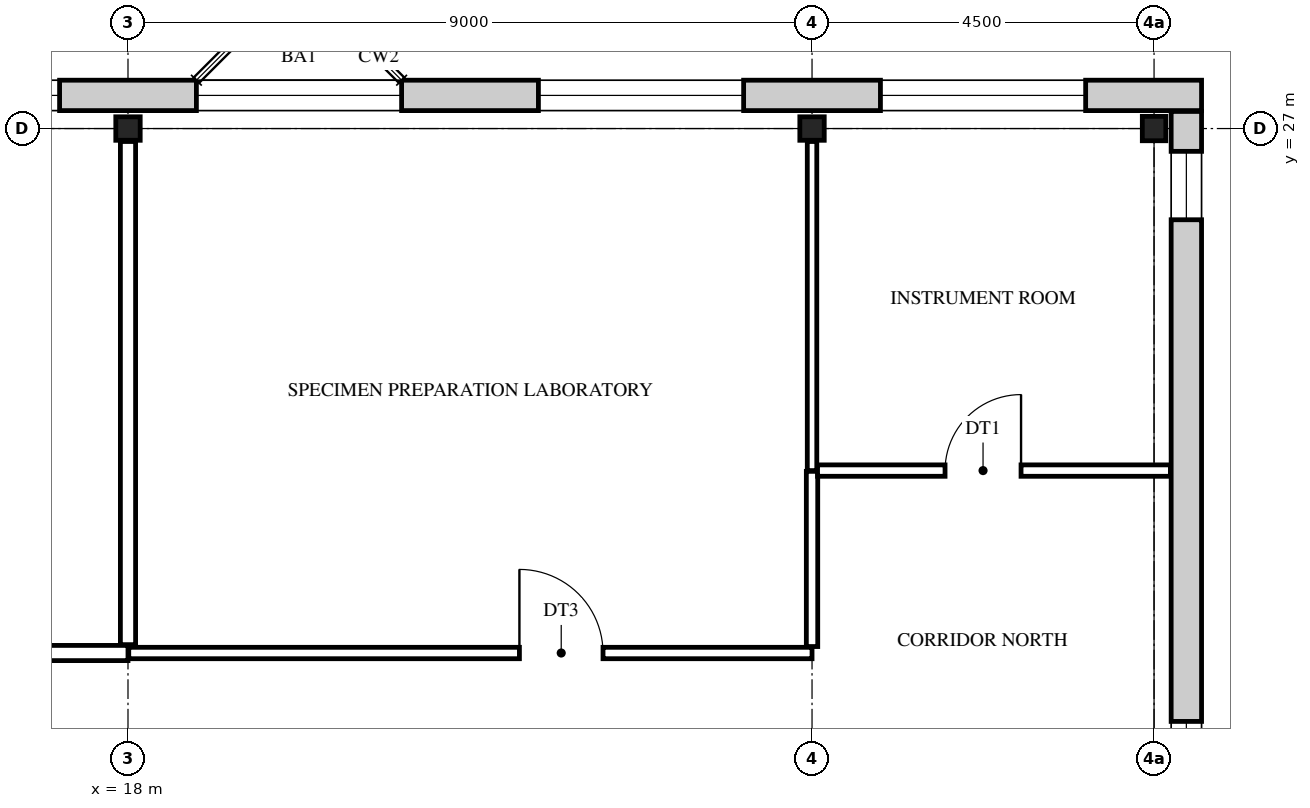
"""IFC4 building model, lengths in metres.
Left out: names, types, materials, properties, quantities, classifications, styles, units other than length and angle.
Written with IfcOpenShell. Run it as: python <this file> out.ifc"""

import sys

from ifc_helpers import new_model, si_unit, direction, frame, frame_2d, origin, origin_2d, place, context, subcontext, project, spatial, rectangle, i_section, extrude, element, fill, save


model = new_model("IFC4")
c1 = context("Model", 3, precision=1e-05, world=origin(), true_north=direction((0.0, 1.0)))
c2 = subcontext(c1, "Body", "Model", "MODEL_VIEW")
j1 = project(units=[si_unit("LENGTHUNIT", "METRE"), si_unit("PLANEANGLEUNIT", "RADIAN")], contexts=[c1])
p1 = place(None, origin())
s1 = spatial("IfcSite", under=j1, at=p1, CompositionType="ELEMENT")
p2 = place(p1, origin())
s2 = spatial("IfcBuilding", under=s1, at=p2, CompositionType="ELEMENT")
p3 = place(p2, frame((0.0, 0.0, 44.4)))
s3 = spatial("IfcBuildingStorey", under=s2, at=p3, CompositionType="ELEMENT", Elevation=44.4)
for number, where, z_axis, x_axis in (
    (1, (18.0, 27.0, 0.0), (0.0, 0.0, 1.0), (0.0, 1.0, 0.0)),
    (2, (27.0, 27.0, 0.0), (0.0, 0.0, 1.0), (0.0, 1.0, 0.0)),
    (3, (31.5, 27.0, 0.0), (0.0, 0.0, 1.0), (1.0, 0.0, 0.0)),
):
    element("IfcColumn", number, at=place(p3, frame(where, z_axis=z_axis, x_axis=x_axis)), inside=s3, PredefinedType="COLUMN", context=c2, shape_type="SweptSolid", body=[
        extrude(i_section(OverallWidth=0.309, OverallDepth=0.321, WebThickness=0.014, FlangeThickness=0.022, FilletRadius=0.017, at=origin_2d()), origin(), (0.0, 0.0, 1.0), 4.2),
    ])
p4 = place(p3, frame((-0.625, 27.436, 0.0), z_axis=(0.0, 0.0, 1.0), x_axis=(1.0, 0.0, 0.0)))
e4 = element("IfcWall", 4, at=p4, inside=s3, PredefinedType="STANDARD", context=c2, shape_type="SweptSolid", body=[
    extrude(rectangle(XDim=32.75, YDim=0.4, at=frame_2d((16.375, 0.0))), origin(), (0.0, 0.0, 1.0), 4.2),
])
p5 = place(p4, frame((1.525, 0.0, 0.9)))
e5 = element("IfcOpeningElement", 5, at=p5, cuts=e4, PredefinedType="OPENING", context=c2, shape_type="SweptSolid", body=[
    extrude(rectangle(XDim=2.7, YDim=2.5, at=frame_2d((1.35, 1.25))), frame((0.0, 0.21, 0.0), z_axis=(0.0, -1.0, 0.0), x_axis=(1.0, 0.0, 0.0)), (0.0, 0.0, 1.0), 0.42),
])
p6 = place(p4, frame((6.025, 0.0, 0.9)))
e6 = element("IfcOpeningElement", 6, at=p6, cuts=e4, PredefinedType="OPENING", context=c2, shape_type="SweptSolid", body=[
    extrude(rectangle(XDim=2.7, YDim=2.5, at=frame_2d((1.35, 1.25))), frame((0.0, 0.21, 0.0), z_axis=(0.0, -1.0, 0.0), x_axis=(1.0, 0.0, 0.0)), (0.0, 0.0, 1.0), 0.42),
])
p7 = place(p4, frame((10.525, 0.0, 0.9)))
e7 = element("IfcOpeningElement", 7, at=p7, cuts=e4, PredefinedType="OPENING", context=c2, shape_type="SweptSolid", body=[
    extrude(rectangle(XDim=2.7, YDim=2.5, at=frame_2d((1.35, 1.25))), frame((0.0, 0.21, 0.0), z_axis=(0.0, -1.0, 0.0), x_axis=(1.0, 0.0, 0.0)), (0.0, 0.0, 1.0), 0.42),
])
p8 = place(p4, frame((15.025, 0.0, 0.9)))
e8 = element("IfcOpeningElement", 8, at=p8, cuts=e4, PredefinedType="OPENING", context=c2, shape_type="SweptSolid", body=[
    extrude(rectangle(XDim=2.7, YDim=2.5, at=frame_2d((1.35, 1.25))), frame((0.0, 0.21, 0.0), z_axis=(0.0, -1.0, 0.0), x_axis=(1.0, 0.0, 0.0)), (0.0, 0.0, 1.0), 0.42),
])
p9 = place(p4, frame((19.525, 0.0, 0.9)))
e9 = element("IfcOpeningElement", 9, at=p9, cuts=e4, PredefinedType="OPENING", context=c2, shape_type="SweptSolid", body=[
    extrude(rectangle(XDim=2.7, YDim=2.5, at=frame_2d((1.35, 1.25))), frame((0.0, 0.21, 0.0), z_axis=(0.0, -1.0, 0.0), x_axis=(1.0, 0.0, 0.0)), (0.0, 0.0, 1.0), 0.42),
])
p10 = place(p4, frame((24.025, 0.0, 0.9)))
e10 = element("IfcOpeningElement", 10, at=p10, cuts=e4, PredefinedType="OPENING", context=c2, shape_type="SweptSolid", body=[
    extrude(rectangle(XDim=2.7, YDim=2.5, at=frame_2d((1.35, 1.25))), frame((0.0, 0.21, 0.0), z_axis=(0.0, -1.0, 0.0), x_axis=(1.0, 0.0, 0.0)), (0.0, 0.0, 1.0), 0.42),
])
p11 = place(p4, frame((28.525, 0.0, 0.9)))
e11 = element("IfcOpeningElement", 11, at=p11, cuts=e4, PredefinedType="OPENING", context=c2, shape_type="SweptSolid", body=[
    extrude(rectangle(XDim=2.7, YDim=2.5, at=frame_2d((1.35, 1.25))), frame((0.0, 0.21, 0.0), z_axis=(0.0, -1.0, 0.0), x_axis=(1.0, 0.0, 0.0)), (0.0, 0.0, 1.0), 0.42),
])
p12 = place(p3, frame((31.925, 27.225, 0.0), z_axis=(0.0, 0.0, 1.0), x_axis=(0.0, -1.0, 0.0)))
e12 = element("IfcWall", 12, at=p12, inside=s3, PredefinedType="STANDARD", context=c2, shape_type="SweptSolid", body=[
    extrude(rectangle(XDim=27.45, YDim=0.4, at=frame_2d((13.725, 0.0))), origin(), (0.0, 0.0, 1.0), 4.2),
])
p13 = place(p12, frame((26.025, 0.0, 0.9)))
e13 = element("IfcOpeningElement", 13, at=p13, cuts=e12, PredefinedType="OPENING", context=c2, shape_type="SweptSolid", body=[
    extrude(rectangle(XDim=0.9, YDim=2.0, at=frame_2d((0.45, 1.0))), frame((0.0, 0.21, 0.0), z_axis=(0.0, -1.0, 0.0), x_axis=(1.0, 0.0, 0.0)), (0.0, 0.0, 1.0), 0.42),
])
p14 = place(p12, frame((18.525, 0.0, 0.9)))
e14 = element("IfcOpeningElement", 14, at=p14, cuts=e12, PredefinedType="OPENING", context=c2, shape_type="SweptSolid", body=[
    extrude(rectangle(XDim=0.9, YDim=2.0, at=frame_2d((0.45, 1.0))), frame((0.0, 0.21, 0.0), z_axis=(0.0, -1.0, 0.0), x_axis=(1.0, 0.0, 0.0)), (0.0, 0.0, 1.0), 0.42),
])
p15 = place(p12, frame((15.675, 0.0, 1.6)))
e15 = element("IfcOpeningElement", 15, at=p15, cuts=e12, PredefinedType="OPENING", context=c2, shape_type="SweptSolid", body=[
    extrude(rectangle(XDim=0.6, YDim=0.9, at=frame_2d((0.3, 0.45))), frame((0.0, 0.21, 0.0), z_axis=(0.0, -1.0, 0.0), x_axis=(1.0, 0.0, 0.0)), (0.0, 0.0, 1.0), 0.42),
])
p16 = place(p12, frame((11.175, 0.0, 1.6)))
e16 = element("IfcOpeningElement", 16, at=p16, cuts=e12, PredefinedType="OPENING", context=c2, shape_type="SweptSolid", body=[
    extrude(rectangle(XDim=0.6, YDim=0.9, at=frame_2d((0.3, 0.45))), frame((0.0, 0.21, 0.0), z_axis=(0.0, -1.0, 0.0), x_axis=(1.0, 0.0, 0.0)), (0.0, 0.0, 1.0), 0.42),
])
p17 = place(p12, frame((8.025, 0.0, 0.9)))
e17 = element("IfcOpeningElement", 17, at=p17, cuts=e12, PredefinedType="OPENING", context=c2, shape_type="SweptSolid", body=[
    extrude(rectangle(XDim=0.9, YDim=2.0, at=frame_2d((0.45, 1.0))), frame((0.0, 0.21, 0.0), z_axis=(0.0, -1.0, 0.0), x_axis=(1.0, 0.0, 0.0)), (0.0, 0.0, 1.0), 0.42),
])
p18 = place(p12, frame((0.525, 0.0, 0.9)))
e18 = element("IfcOpeningElement", 18, at=p18, cuts=e12, PredefinedType="OPENING", context=c2, shape_type="SweptSolid", body=[
    extrude(rectangle(XDim=0.9, YDim=2.0, at=frame_2d((0.45, 1.0))), frame((0.0, 0.21, 0.0), z_axis=(0.0, -1.0, 0.0), x_axis=(1.0, 0.0, 0.0)), (0.0, 0.0, 1.0), 0.42),
])
p19 = place(p3, frame((18.0, 20.21, 0.0), z_axis=(0.0, 0.0, 1.0), x_axis=(0.0, 1.0, 0.0)))
e19 = element("IfcWall", 19, at=p19, inside=s3, PredefinedType="PARTITIONING", context=c2, shape_type="SweptSolid", body=[
    extrude(rectangle(XDim=6.62, YDim=0.2, at=frame_2d((3.31, 0.0))), origin(), (0.0, 0.0, 1.0), 3.542),
])
p20 = place(p3, frame((27.0, 20.185, 0.0), z_axis=(0.0, 0.0, 1.0), x_axis=(0.0, 1.0, 0.0)))
e20 = element("IfcWall", 20, at=p20, inside=s3, PredefinedType="PARTITIONING", context=c2, shape_type="SweptSolid", body=[
    extrude(rectangle(XDim=2.305, YDim=0.15, at=frame_2d((1.152, 0.0))), origin(), (0.0, 0.0, 1.0), 3.542),
])
p21 = place(p3, frame((27.0, 22.5, 0.0), z_axis=(0.0, 0.0, 1.0), x_axis=(0.0, 1.0, 0.0)))
e21 = element("IfcWall", 21, at=p21, inside=s3, PredefinedType="PARTITIONING", context=c2, shape_type="SweptSolid", body=[
    extrude(rectangle(XDim=4.33, YDim=0.125, at=frame_2d((2.165, 0.0))), origin(), (0.0, 0.0, 1.0), 3.542),
])
p22 = place(p3, frame((6.9, 20.1, 0.0), z_axis=(0.0, 0.0, 1.0), x_axis=(1.0, 0.0, 0.0)))
e22 = element("IfcWall", 22, at=p22, inside=s3, PredefinedType="PARTITIONING", context=c2, shape_type="SweptSolid", body=[
    extrude(rectangle(XDim=11.1, YDim=0.2, at=frame_2d((5.55, 0.0))), origin(), (0.0, 0.0, 1.0), 3.542),
])
p23 = place(p22, frame((4.0, 0.0, 0.0)))
e23 = element("IfcOpeningElement", 23, at=p23, cuts=e22, PredefinedType="OPENING", context=c2, shape_type="SweptSolid", body=[
    extrude(rectangle(XDim=1.0, YDim=2.1, at=frame_2d((0.5, 1.05))), frame((0.0, 0.11, 0.0), z_axis=(0.0, -1.0, 0.0), x_axis=(1.0, 0.0, 0.0)), (0.0, 0.0, 1.0), 0.22),
])
p24 = place(p3, frame((18.01, 20.1, 0.0), z_axis=(0.0, 0.0, 1.0), x_axis=(1.0, 0.0, 0.0)))
e24 = element("IfcWall", 24, at=p24, inside=s3, PredefinedType="PARTITIONING", context=c2, shape_type="SweptSolid", body=[
    extrude(rectangle(XDim=8.99, YDim=0.15, at=frame_2d((4.495, 0.0))), origin(), (0.0, 0.0, 1.0), 3.542),
])
p25 = place(p24, frame((5.14, 0.0, 0.0)))
e25 = element("IfcOpeningElement", 25, at=p25, cuts=e24, PredefinedType="OPENING", context=c2, shape_type="SweptSolid", body=[
    extrude(rectangle(XDim=1.1, YDim=2.1, at=frame_2d((0.55, 1.05))), frame((0.0, 0.085, 0.0), z_axis=(0.0, -1.0, 0.0), x_axis=(1.0, 0.0, 0.0)), (0.0, 0.0, 1.0), 0.17),
])
p26 = place(p3, frame((27.073, 22.5, 0.0), z_axis=(0.0, 0.0, 1.0), x_axis=(1.0, 0.0, 0.0)))
e26 = element("IfcWall", 26, at=p26, inside=s3, PredefinedType="PARTITIONING", context=c2, shape_type="SweptSolid", body=[
    extrude(rectangle(XDim=4.643, YDim=0.15, at=frame_2d((2.321, 0.0))), origin(), (0.0, 0.0, 1.0), 3.542),
])
p27 = place(p26, frame((1.677, 0.0, 0.0)))
e27 = element("IfcOpeningElement", 27, at=p27, cuts=e26, PredefinedType="OPENING", context=c2, shape_type="SweptSolid", body=[
    extrude(rectangle(XDim=1.0, YDim=2.1, at=frame_2d((0.5, 1.05))), frame((0.0, 0.085, 0.0), z_axis=(0.0, -1.0, 0.0), x_axis=(1.0, 0.0, 0.0)), (0.0, 0.0, 1.0), 0.17),
])
p28 = place(p8, origin())
e28 = element("IfcWindow", 28, at=p28, inside=s3, PartitioningType="SINGLE_PANEL", PredefinedType="WINDOW", context=c2, shape_type="SweptSolid", body=[
    extrude(rectangle(XDim=2.7, YDim=2.5, at=frame_2d((1.35, 1.25))), frame((0.0, 0.03, 0.0), z_axis=(0.0, -1.0, 0.0), x_axis=(1.0, 0.0, 0.0)), (0.0, 0.0, 1.0), 0.06),
])
fill(e8, e28)
p29 = place(p9, origin())
e29 = element("IfcWindow", 29, at=p29, inside=s3, PartitioningType="SINGLE_PANEL", PredefinedType="WINDOW", context=c2, shape_type="SweptSolid", body=[
    extrude(rectangle(XDim=2.7, YDim=2.5, at=frame_2d((1.35, 1.25))), frame((0.0, 0.03, 0.0), z_axis=(0.0, -1.0, 0.0), x_axis=(1.0, 0.0, 0.0)), (0.0, 0.0, 1.0), 0.06),
])
fill(e9, e29)
p30 = place(p10, origin())
e30 = element("IfcWindow", 30, at=p30, inside=s3, PartitioningType="SINGLE_PANEL", PredefinedType="WINDOW", context=c2, shape_type="SweptSolid", body=[
    extrude(rectangle(XDim=2.7, YDim=2.5, at=frame_2d((1.35, 1.25))), frame((0.0, 0.03, 0.0), z_axis=(0.0, -1.0, 0.0), x_axis=(1.0, 0.0, 0.0)), (0.0, 0.0, 1.0), 0.06),
])
fill(e10, e30)
p31 = place(p11, origin())
e31 = element("IfcWindow", 31, at=p31, inside=s3, PartitioningType="SINGLE_PANEL", PredefinedType="WINDOW", context=c2, shape_type="SweptSolid", body=[
    extrude(rectangle(XDim=2.7, YDim=2.5, at=frame_2d((1.35, 1.25))), frame((0.0, 0.03, 0.0), z_axis=(0.0, -1.0, 0.0), x_axis=(1.0, 0.0, 0.0)), (0.0, 0.0, 1.0), 0.06),
])
fill(e11, e31)
p32 = place(p17, origin())
e32 = element("IfcWindow", 32, at=p32, inside=s3, PartitioningType="SINGLE_PANEL", PredefinedType="WINDOW", context=c2, shape_type="SweptSolid", body=[
    extrude(rectangle(XDim=0.9, YDim=2.0, at=frame_2d((0.45, 1.0))), frame((0.0, 0.03, 0.0), z_axis=(0.0, -1.0, 0.0), x_axis=(1.0, 0.0, 0.0)), (0.0, 0.0, 1.0), 0.06),
])
fill(e17, e32)
p33 = place(p18, origin())
e33 = element("IfcWindow", 33, at=p33, inside=s3, PartitioningType="SINGLE_PANEL", PredefinedType="WINDOW", context=c2, shape_type="SweptSolid", body=[
    extrude(rectangle(XDim=0.9, YDim=2.0, at=frame_2d((0.45, 1.0))), frame((0.0, 0.03, 0.0), z_axis=(0.0, -1.0, 0.0), x_axis=(1.0, 0.0, 0.0)), (0.0, 0.0, 1.0), 0.06),
])
fill(e18, e33)
p34 = place(p25, origin())
e34 = element("IfcDoor", 34, at=p34, inside=s3, OperationType="SINGLE_SWING_LEFT", PredefinedType="DOOR", context=c2, shape_type="SweptSolid", body=[
    extrude(rectangle(XDim=1.1, YDim=2.1, at=frame_2d((0.55, 1.05))), frame((0.0, 0.025, 0.0), z_axis=(0.0, -1.0, 0.0), x_axis=(1.0, 0.0, 0.0)), (0.0, 0.0, 1.0), 0.05),
])
fill(e25, e34)
p35 = place(p27, origin())
e35 = element("IfcDoor", 35, at=p35, inside=s3, OperationType="SINGLE_SWING_RIGHT", PredefinedType="DOOR", context=c2, shape_type="SweptSolid", body=[
    extrude(rectangle(XDim=1.0, YDim=2.1, at=frame_2d((0.5, 1.05))), frame((0.0, 0.025, 0.0), z_axis=(0.0, -1.0, 0.0), x_axis=(1.0, 0.0, 0.0)), (0.0, 0.0, 1.0), 0.05),
])
fill(e27, e35)
save(model, sys.argv[1])
